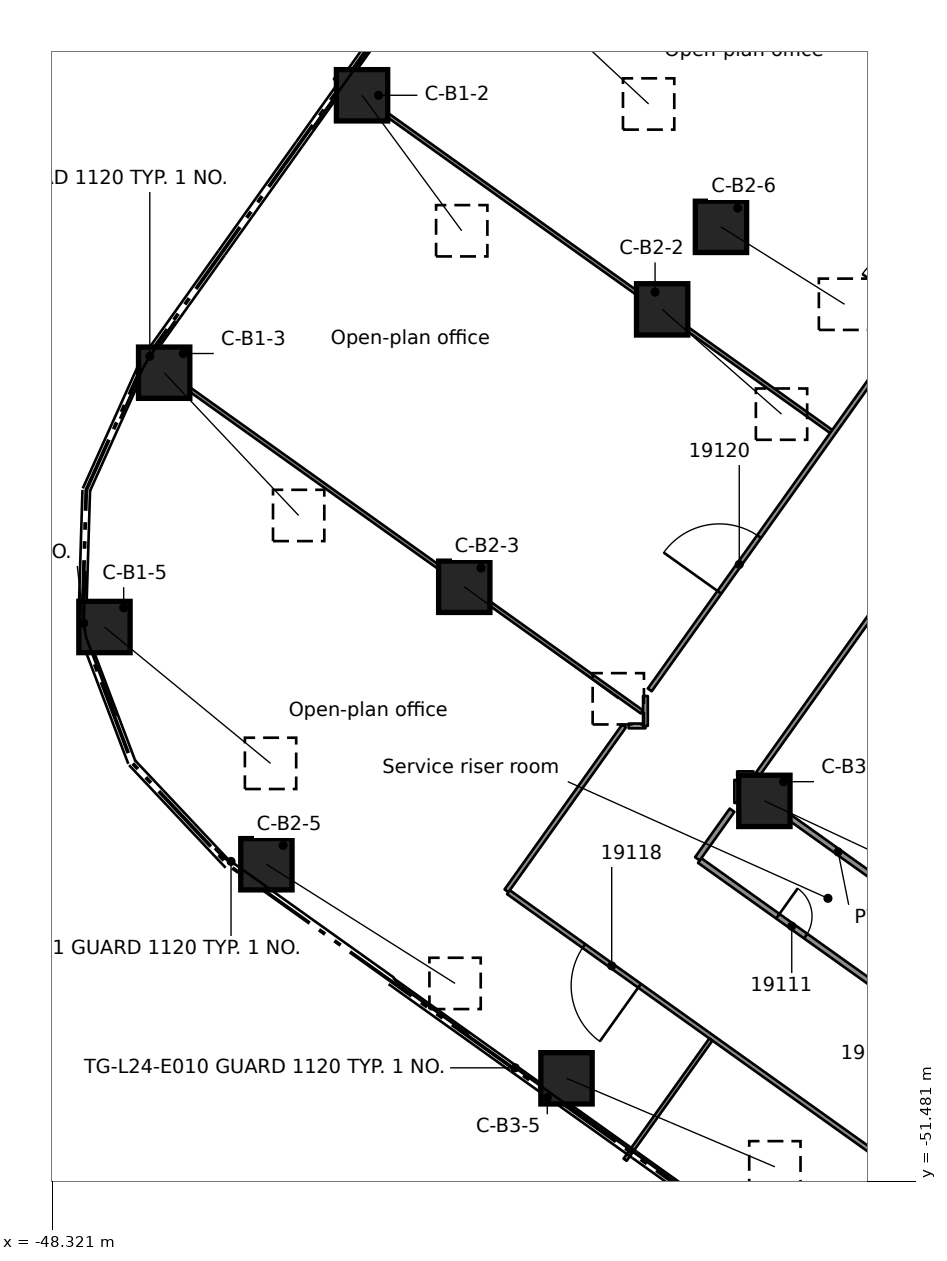
"""IFC4 building model, lengths in metres.
Left out: names, types, materials, properties, quantities, classifications, styles, units other than length and angle.
Written with IfcOpenShell. Run it as: python <this file> out.ifc"""

import sys

from ifc_helpers import new_model, si_unit, direction, frame, frame_2d, origin, origin_2d, place, context, subcontext, project, spatial, rectangle, extrude, element, fill, save


model = new_model("IFC4")
c1 = context("Model", 3, precision=1e-05, world=origin(), true_north=direction((0.0, 1.0)))
c2 = subcontext(c1, "Body", "Model", "MODEL_VIEW")
j1 = project(units=[si_unit("LENGTHUNIT", "METRE"), si_unit("PLANEANGLEUNIT", "RADIAN")], contexts=[c1])
p1 = place(None, origin())
s1 = spatial("IfcSite", under=j1, at=p1, CompositionType="ELEMENT")
p2 = place(p1, origin())
s2 = spatial("IfcBuilding", under=s1, at=p2, CompositionType="ELEMENT")
p3 = place(p2, frame((0.0, 0.0, 98.2)))
s3 = spatial("IfcBuildingStorey", under=s2, at=p3, CompositionType="ELEMENT", Elevation=98.2)
p4 = place(p3, frame((-40.164, -22.9, 0.567), z_axis=(0.497397176201, -0.676050908792, 0.543646224882), x_axis=(0.805479866843, 0.592623138352, 0.0)))
e1 = element("IfcColumn", 1, at=p4, inside=s3, PredefinedType="COLUMN", context=c2, shape_type="SweptSolid", body=[
    extrude(rectangle(XDim=1.35, YDim=1.35, at=origin_2d()), origin(), (0.0, 0.0, 1.0), 5.273),
])
p5 = place(p3, frame((-45.371, -30.2, 0.593), z_axis=(0.602031387632, -0.638952324691, 0.478850848468), x_axis=(0.727822118455, 0.685765968744, 0.0)))
e2 = element("IfcColumn", 2, at=p5, inside=s3, PredefinedType="COLUMN", context=c2, shape_type="SweptSolid", body=[
    extrude(rectangle(XDim=1.35, YDim=1.35, at=origin_2d()), origin(), (0.0, 0.0, 1.0), 5.878),
])
p6 = place(p3, frame((-46.942, -36.891, 0.605), z_axis=(0.693115832957, -0.569083763402, 0.442418481006), x_axis=(0.634565373969, 0.772869190846, 0.0)))
e3 = element("IfcColumn", 3, at=p6, inside=s3, PredefinedType="COLUMN", context=c2, shape_type="SweptSolid", body=[
    extrude(rectangle(XDim=1.35, YDim=1.35, at=origin_2d()), origin(), (0.0, 0.0, 1.0), 6.305),
])
p7 = place(p3, frame((-35.328, -20.609, 0.528), z_axis=(0.572340427973, -0.533233856624, 0.622967164991), x_axis=(0.681668558156, 0.731661107906, 0.0)))
e4 = element("IfcColumn", 4, at=p7, inside=s3, PredefinedType="COLUMN", context=c2, shape_type="SweptSolid", body=[
    extrude(rectangle(XDim=1.35, YDim=1.35, at=origin_2d()), origin(), (0.0, 0.0, 1.0), 4.726),
])
p8 = place(p3, frame((-32.267, -28.533, 0.555), z_axis=(0.618188651788, -0.542608770763, 0.568698964912), x_axis=(0.659670030756, 0.751555354264, 0.0)))
e5 = element("IfcColumn", 5, at=p8, inside=s3, PredefinedType="COLUMN", context=c2, shape_type="SweptSolid", body=[
    extrude(rectangle(XDim=1.35, YDim=1.35, at=origin_2d()), origin(), (0.0, 0.0, 1.0), 5.081),
])
p9 = place(p3, frame((-37.474, -35.833, 0.588), z_axis=(0.704647222217, -0.512335659522, 0.490901684867), x_axis=(0.58807030775, 0.808809812714, 0.0)))
e6 = element("IfcColumn", 6, at=p9, inside=s3, PredefinedType="COLUMN", context=c2, shape_type="SweptSolid", body=[
    extrude(rectangle(XDim=1.35, YDim=1.35, at=origin_2d()), origin(), (0.0, 0.0, 1.0), 5.752),
])
p10 = place(p3, frame((-42.681, -43.133, 0.61), z_axis=(0.764172274893, -0.482680609314, 0.42785530694), x_axis=(0.534028967558, 0.845466180168, 0.0)))
e7 = element("IfcColumn", 7, at=p10, inside=s3, PredefinedType="COLUMN", context=c2, shape_type="SweptSolid", body=[
    extrude(rectangle(XDim=1.35, YDim=1.35, at=origin_2d()), origin(), (0.0, 0.0, 1.0), 6.497),
])
p11 = place(p3, frame((-30.719, -26.362, 0.537), z_axis=(0.673755446544, -0.422134401511, 0.606511455221), x_axis=(0.530936748584, 0.847411452013, 0.0)))
e8 = element("IfcColumn", 8, at=p11, inside=s3, PredefinedType="COLUMN", context=c2, shape_type="SweptSolid", body=[
    extrude(rectangle(XDim=1.35, YDim=1.35, at=origin_2d()), origin(), (0.0, 0.0, 1.0), 4.825),
])
p12 = place(p3, frame((-29.577, -41.466, 0.589), z_axis=(0.790481731796, -0.369986668034, 0.488107055033), x_axis=(0.423915616094, 0.905701689538, 0.0)))
e9 = element("IfcColumn", 9, at=p12, inside=s3, PredefinedType="COLUMN", context=c2, shape_type="SweptSolid", body=[
    extrude(rectangle(XDim=1.35, YDim=1.35, at=origin_2d()), origin(), (0.0, 0.0, 1.0), 5.781),
])
p13 = place(p3, frame((-34.784, -48.766, 0.612), z_axis=(0.834299149524, -0.35421864773, 0.422461925745), x_axis=(0.39080560624, 0.920473235967, 0.0)))
e10 = element("IfcColumn", 10, at=p13, inside=s3, PredefinedType="COLUMN", context=c2, shape_type="SweptSolid", body=[
    extrude(rectangle(XDim=1.35, YDim=1.35, at=origin_2d()), origin(), (0.0, 0.0, 1.0), 6.572),
])
p14 = place(p3, frame((-25.586, -51.52, 0.0), z_axis=(0.0, 0.0, 1.0), x_axis=(-0.814070118749, 0.580766598351, 0.0)))
e11 = element("IfcWall", 11, at=p14, inside=s3, PredefinedType="PARTITIONING", context=c2, shape_type="SweptSolid", body=[
    extrude(rectangle(XDim=13.176, YDim=0.125, at=frame_2d((6.588, 0.0))), origin(), (0.0, 0.0, 1.0), 3.58),
])
p15 = place(p14, frame((8.938, 0.0, 0.0)))
e12 = element("IfcOpeningElement", 12, at=p15, cuts=e11, PredefinedType="OPENING", context=c2, shape_type="SweptSolid", body=[
    extrude(rectangle(XDim=1.8, YDim=2.1, at=frame_2d((0.9, 1.05))), frame((0.0, 0.073, 0.0), z_axis=(0.0, -1.0, 0.0), x_axis=(1.0, 0.0, 0.0)), (0.0, 0.0, 1.0), 0.145),
])
p16 = place(p3, frame((-31.279, -43.035, 0.0), z_axis=(0.0, 0.0, 1.0), x_axis=(0.814146456828, -0.58065957913, 0.0)))
e13 = element("IfcWall", 13, at=p16, inside=s3, PredefinedType="PARTITIONING", context=c2, shape_type="SweptSolid", body=[
    extrude(rectangle(XDim=5.948, YDim=0.15, at=frame_2d((2.974, 0.0))), origin(), (0.0, 0.0, 1.0), 3.58),
])
p17 = place(p16, frame((2.525, 0.0, 0.0)))
e14 = element("IfcOpeningElement", 14, at=p17, cuts=e13, PredefinedType="OPENING", context=c2, shape_type="SweptSolid", body=[
    extrude(rectangle(XDim=0.9, YDim=2.1, at=frame_2d((0.45, 1.05))), frame((0.0, 0.085, 0.0), z_axis=(0.0, -1.0, 0.0), x_axis=(1.0, 0.0, 0.0)), (0.0, 0.0, 1.0), 0.17),
])
p18 = place(p3, frame((-46.044, -29.68, 0.0), z_axis=(0.0, 0.0, 1.0), x_axis=(0.814128729821, -0.580684433475, 0.0)))
e15 = element("IfcWall", 15, at=p18, inside=s3, PredefinedType="PARTITIONING", context=c2, shape_type="SweptSolid", body=[
    extrude(rectangle(XDim=16.269, YDim=0.1, at=frame_2d((8.134, 0.0))), origin(), (0.0, 0.0, 1.0), 3.58),
])
p19 = place(p3, frame((-30.173, -41.0, 0.0), z_axis=(0.0, 0.0, 1.0), x_axis=(0.81418338872, -0.580607793207, 0.0)))
e16 = element("IfcWall", 16, at=p19, inside=s3, PredefinedType="PARTITIONING", context=c2, shape_type="SweptSolid", body=[
    extrude(rectangle(XDim=6.229, YDim=0.15, at=frame_2d((3.115, 0.0))), origin(), (0.0, 0.0, 1.0), 3.58),
])
p20 = place(p3, frame((-40.875, -22.433, 0.0), z_axis=(0.0, 0.0, 1.0), x_axis=(0.814077901833, -0.580755688519, 0.0)))
e17 = element("IfcWall", 17, at=p20, inside=s3, PredefinedType="PARTITIONING", context=c2, shape_type="SweptSolid", body=[
    extrude(rectangle(XDim=16.038, YDim=0.1, at=frame_2d((8.019, 0.0))), origin(), (0.0, 0.0, 1.0), 3.58),
])
p21 = place(p3, frame((-34.89, -14.042, 0.0), z_axis=(0.0, 0.0, 1.0), x_axis=(0.814087743621, -0.580741892484, 0.0)))
e18 = element("IfcWall", 18, at=p21, inside=s3, PredefinedType="PARTITIONING", context=c2, shape_type="SweptSolid", body=[
    extrude(rectangle(XDim=15.732, YDim=0.1, at=frame_2d((7.866, 0.0))), origin(), (0.0, 0.0, 1.0), 3.58),
])
p22 = place(p3, frame((-30.292, -40.752, 0.0), z_axis=(0.0, 0.0, 1.0), x_axis=(1.0, 0.0, 0.0)))
e19 = element("IfcWall", 19, at=p22, inside=s3, PredefinedType="PARTITIONING", context=c2, shape_type="SweptSolid", body=[
    extrude(rectangle(XDim=0.428, YDim=0.125, at=frame_2d((0.214, 0.0))), origin(), (0.0, 0.0, 1.0), 3.58),
])
p23 = place(p3, frame((-33.148, -39.494, 0.0), z_axis=(0.0, 0.0, 1.0), x_axis=(1.0, 0.0, 0.0)))
e20 = element("IfcWall", 20, at=p23, inside=s3, PredefinedType="PARTITIONING", context=c2, shape_type="SweptSolid", body=[
    extrude(rectangle(XDim=0.441, YDim=0.125, at=frame_2d((0.22, 0.0))), origin(), (0.0, 0.0, 1.0), 3.58),
])
p24 = place(p3, frame((-33.242, -50.909, 0.0), z_axis=(0.0, 0.0, 1.0), x_axis=(0.580721073217, 0.814102594961, 0.0)))
e21 = element("IfcWall", 21, at=p24, inside=s3, PredefinedType="PARTITIONING", context=c2, shape_type="SweptSolid", body=[
    extrude(rectangle(XDim=3.886, YDim=0.1, at=frame_2d((1.943, 0.0))), origin(), (0.0, 0.0, 1.0), 3.58),
])
p25 = place(p3, frame((-31.34, -42.991, 0.0), z_axis=(0.0, 0.0, 1.0), x_axis=(0.580605884061, 0.81418475016, 0.0)))
e22 = element("IfcWall", 22, at=p25, inside=s3, PredefinedType="PARTITIONING", context=c2, shape_type="SweptSolid", body=[
    extrude(rectangle(XDim=1.571, YDim=0.15, at=frame_2d((0.786, 0.0))), origin(), (0.0, 0.0, 1.0), 3.58),
])
p26 = place(p3, frame((-29.743, -40.751, 0.0), z_axis=(0.0, 0.0, 1.0), x_axis=(0.580742324447, 0.814087435473, 0.0)))
e23 = element("IfcWall", 23, at=p26, inside=s3, PredefinedType="PARTITIONING", context=c2, shape_type="SweptSolid", body=[
    extrude(rectangle(XDim=7.826, YDim=0.125, at=frame_2d((3.913, 0.0))), origin(), (0.0, 0.0, 1.0), 3.58),
])
p27 = place(p3, frame((-36.363, -43.832, 0.0), z_axis=(0.0, 0.0, 1.0), x_axis=(0.580644082499, 0.814157508999, 0.0)))
e24 = element("IfcWall", 24, at=p27, inside=s3, PredefinedType="PARTITIONING", context=c2, shape_type="SweptSolid", body=[
    extrude(rectangle(XDim=5.327, YDim=0.125, at=frame_2d((2.664, 0.0))), origin(), (0.0, 0.0, 1.0), 3.58),
])
p28 = place(p3, frame((-32.593, -38.546, 0.0), z_axis=(0.0, 0.0, 1.0), x_axis=(0.580752168923, 0.814080412669, 0.0)))
e25 = element("IfcWall", 25, at=p28, inside=s3, PredefinedType="PARTITIONING", context=c2, shape_type="SweptSolid", body=[
    extrude(rectangle(XDim=18.013, YDim=0.125, at=frame_2d((9.006, 0.0))), origin(), (0.0, 0.0, 1.0), 3.58),
])
p29 = place(p28, frame((12.158, 0.0, 0.0)))
e26 = element("IfcOpeningElement", 26, at=p29, cuts=e25, PredefinedType="OPENING", context=c2, shape_type="SweptSolid", body=[
    extrude(rectangle(XDim=1.8, YDim=2.1, at=frame_2d((0.9, 1.05))), frame((0.0, 0.073, 0.0), z_axis=(0.0, -1.0, 0.0), x_axis=(1.0, 0.0, 0.0)), (0.0, 0.0, 1.0), 0.145),
])
p30 = place(p28, frame((3.155, 0.0, 0.0)))
e27 = element("IfcOpeningElement", 27, at=p30, cuts=e25, PredefinedType="OPENING", context=c2, shape_type="SweptSolid", body=[
    extrude(rectangle(XDim=1.8, YDim=2.1, at=frame_2d((0.9, 1.05))), frame((0.0, 0.073, 0.0), z_axis=(0.0, -1.0, 0.0), x_axis=(1.0, 0.0, 0.0)), (0.0, 0.0, 1.0), 0.145),
])
p31 = place(p3, frame((-30.292, -41.521, 0.0), z_axis=(0.0, 0.0, 1.0), x_axis=(0.0, 1.0, 0.0)))
e28 = element("IfcWall", 28, at=p31, inside=s3, PredefinedType="PARTITIONING", context=c2, shape_type="SweptSolid", body=[
    extrude(rectangle(XDim=0.606, YDim=0.15, at=frame_2d((0.303, 0.0))), origin(), (0.0, 0.0, 1.0), 3.58),
])
p32 = place(p3, frame((-32.707, -39.494, 0.0), z_axis=(0.0, 0.0, 1.0), x_axis=(0.0, 1.0, 0.0)))
e29 = element("IfcWall", 29, at=p32, inside=s3, PredefinedType="PARTITIONING", context=c2, shape_type="SweptSolid", body=[
    extrude(rectangle(XDim=0.788, YDim=0.125, at=frame_2d((0.394, 0.0))), origin(), (0.0, 0.0, 1.0), 3.58),
])
p33 = place(p17, origin())
e30 = element("IfcDoor", 30, at=p33, inside=s3, OperationType="SINGLE_SWING_RIGHT", PredefinedType="DOOR", context=c2, shape_type="SweptSolid", body=[
    extrude(rectangle(XDim=0.9, YDim=2.1, at=frame_2d((0.45, 1.05))), frame((0.0, 0.025, 0.0), z_axis=(0.0, -1.0, 0.0), x_axis=(1.0, 0.0, 0.0)), (0.0, 0.0, 1.0), 0.05),
])
fill(e14, e30)
p34 = place(p15, origin())
e31 = element("IfcDoor", 31, at=p34, inside=s3, OperationType="DOUBLE_DOOR_SINGLE_SWING", PredefinedType="DOOR", context=c2, shape_type="SweptSolid", body=[
    extrude(rectangle(XDim=1.8, YDim=2.1, at=frame_2d((0.9, 1.05))), frame((0.0, 0.025, 0.0), z_axis=(0.0, -1.0, 0.0), x_axis=(1.0, 0.0, 0.0)), (0.0, 0.0, 1.0), 0.05),
])
fill(e12, e31)
p35 = place(p30, origin())
e32 = element("IfcDoor", 32, at=p35, inside=s3, OperationType="DOUBLE_DOOR_SINGLE_SWING", PredefinedType="DOOR", context=c2, shape_type="SweptSolid", body=[
    extrude(rectangle(XDim=1.8, YDim=2.1, at=frame_2d((0.9, 1.05))), frame((0.0, 0.025, 0.0), z_axis=(0.0, -1.0, 0.0), x_axis=(1.0, 0.0, 0.0)), (0.0, 0.0, 1.0), 0.05),
])
fill(e27, e32)
save(model, sys.argv[1])
